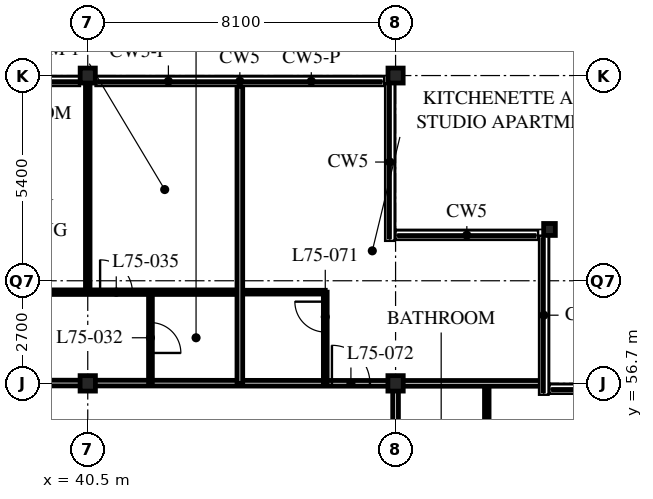
"""IFC4 building model, lengths in metres.
Left out: names, types, materials, properties, quantities, classifications, styles, units other than length and angle.
Written with IfcOpenShell. Run it as: python <this file> out.ifc"""

import sys

from ifc_helpers import new_model, si_unit, direction, frame, frame_2d, origin, origin_2d, place, context, subcontext, project, spatial, rectangle, i_section, extrude, element, fill, save


model = new_model("IFC4")
c1 = context("Model", 3, precision=1e-05, world=origin(), true_north=direction((0.0, 1.0)))
c2 = subcontext(c1, "Body", "Model", "MODEL_VIEW")
j1 = project(units=[si_unit("LENGTHUNIT", "METRE"), si_unit("PLANEANGLEUNIT", "RADIAN")], contexts=[c1])
p1 = place(None, origin())
s1 = spatial("IfcSite", under=j1, at=p1, CompositionType="ELEMENT")
p2 = place(p1, origin())
s2 = spatial("IfcBuilding", under=s1, at=p2, CompositionType="ELEMENT")
p3 = place(p2, frame((0.0, 0.0, 293.1)))
s3 = spatial("IfcBuildingStorey", under=s2, at=p3, CompositionType="ELEMENT", Elevation=293.1)
p4 = place(p3, frame((40.5, 56.7, 0.0), z_axis=(0.0, 0.0, 1.0), x_axis=(1.0, 0.0, 0.0)))
e1 = element("IfcColumn", 1, at=p4, inside=s3, PredefinedType="COLUMN", context=c2, shape_type="SweptSolid", body=[
    extrude(i_section(OverallWidth=0.403, OverallDepth=0.406, WebThickness=0.027, FlangeThickness=0.043, FilletRadius=0.015, at=origin_2d()), origin(), (0.0, 0.0, 1.0), 5.4),
])
p5 = place(p3, frame((40.5, 64.8, 0.0), z_axis=(0.0, 0.0, 1.0), x_axis=(1.0, 0.0, 0.0)))
e2 = element("IfcColumn", 2, at=p5, inside=s3, PredefinedType="COLUMN", context=c2, shape_type="SweptSolid", body=[
    extrude(i_section(OverallWidth=0.399, OverallDepth=0.394, WebThickness=0.023, FlangeThickness=0.037, FilletRadius=0.015, at=origin_2d()), origin(), (0.0, 0.0, 1.0), 5.4),
])
p6 = place(p3, frame((48.6, 56.7, 0.0), z_axis=(0.0, 0.0, 1.0), x_axis=(1.0, 0.0, 0.0)))
e3 = element("IfcColumn", 3, at=p6, inside=s3, PredefinedType="COLUMN", context=c2, shape_type="SweptSolid", body=[
    extrude(i_section(OverallWidth=0.403, OverallDepth=0.406, WebThickness=0.027, FlangeThickness=0.043, FilletRadius=0.015, at=origin_2d()), origin(), (0.0, 0.0, 1.0), 5.4),
])
p7 = place(p3, frame((48.6, 64.8, 0.0), z_axis=(0.0, 0.0, 1.0), x_axis=(1.0, 0.0, 0.0)))
e4 = element("IfcColumn", 4, at=p7, inside=s3, PredefinedType="COLUMN", context=c2, shape_type="SweptSolid", body=[
    extrude(i_section(OverallWidth=0.399, OverallDepth=0.394, WebThickness=0.023, FlangeThickness=0.037, FilletRadius=0.015, at=origin_2d()), origin(), (0.0, 0.0, 1.0), 5.4),
])
p8 = place(p3, frame((52.65, 60.75, 0.0), z_axis=(0.0, 0.0, 1.0), x_axis=(1.0, 0.0, 0.0)))
e5 = element("IfcColumn", 5, at=p8, inside=s3, PredefinedType="COLUMN", context=c2, shape_type="SweptSolid", body=[
    extrude(i_section(OverallWidth=0.307, OverallDepth=0.314, WebThickness=0.012, FlangeThickness=0.019, FilletRadius=0.015, at=origin_2d()), origin(), (0.0, 0.0, 1.0), 5.4),
])
p9 = place(p3, frame((8.1, 56.738, 0.0), z_axis=(0.0, 0.0, 1.0), x_axis=(0.999999569095, -0.000928336791, 0.0)))
e6 = element("IfcWall", 6, at=p9, inside=s3, PredefinedType="PARTITIONING", context=c2, shape_type="SweptSolid", body=[
    extrude(rectangle(XDim=40.5, YDim=0.15, at=frame_2d((20.25, 0.0))), origin(), (0.0, 0.0, 1.0), 4.271),
])
p10 = place(p9, frame((4.45, 0.0, 0.0)))
e7 = element("IfcOpeningElement", 7, at=p10, cuts=e6, PredefinedType="OPENING", context=c2, shape_type="SweptSolid", body=[
    extrude(rectangle(XDim=1.0, YDim=2.1, at=frame_2d((0.5, 1.05))), frame((0.0, 0.085, 0.0), z_axis=(0.0, -1.0, 0.0), x_axis=(1.0, 0.0, 0.0)), (0.0, 0.0, 1.0), 0.17),
])
p11 = place(p9, frame((12.55, 0.0, 0.0)))
e8 = element("IfcOpeningElement", 8, at=p11, cuts=e6, PredefinedType="OPENING", context=c2, shape_type="SweptSolid", body=[
    extrude(rectangle(XDim=1.0, YDim=2.1, at=frame_2d((0.5, 1.05))), frame((0.0, 0.085, 0.0), z_axis=(0.0, -1.0, 0.0), x_axis=(1.0, 0.0, 0.0)), (0.0, 0.0, 1.0), 0.17),
])
p12 = place(p9, frame((20.65, 0.0, 0.0)))
e9 = element("IfcOpeningElement", 9, at=p12, cuts=e6, PredefinedType="OPENING", context=c2, shape_type="SweptSolid", body=[
    extrude(rectangle(XDim=1.0, YDim=2.1, at=frame_2d((0.5, 1.05))), frame((0.0, 0.085, 0.0), z_axis=(0.0, -1.0, 0.0), x_axis=(1.0, 0.0, 0.0)), (0.0, 0.0, 1.0), 0.17),
])
p13 = place(p9, frame((28.75, 0.0, 0.0)))
e10 = element("IfcOpeningElement", 10, at=p13, cuts=e6, PredefinedType="OPENING", context=c2, shape_type="SweptSolid", body=[
    extrude(rectangle(XDim=1.0, YDim=2.1, at=frame_2d((0.5, 1.05))), frame((0.0, 0.085, 0.0), z_axis=(0.0, -1.0, 0.0), x_axis=(1.0, 0.0, 0.0)), (0.0, 0.0, 1.0), 0.17),
])
p14 = place(p9, frame((38.825, 0.0, 0.0)))
e11 = element("IfcOpeningElement", 11, at=p14, cuts=e6, PredefinedType="OPENING", context=c2, shape_type="SweptSolid", body=[
    extrude(rectangle(XDim=1.0, YDim=2.1, at=frame_2d((0.5, 1.05))), frame((0.0, 0.085, 0.0), z_axis=(0.0, -1.0, 0.0), x_axis=(1.0, 0.0, 0.0)), (0.0, 0.0, 1.0), 0.17),
])
p15 = place(p9, frame((0.675, 0.0, 0.0)))
e12 = element("IfcOpeningElement", 12, at=p15, cuts=e6, PredefinedType="OPENING", context=c2, shape_type="SweptSolid", body=[
    extrude(rectangle(XDim=1.0, YDim=2.1, at=frame_2d((0.5, 1.05))), frame((0.0, 0.085, 0.0), z_axis=(0.0, -1.0, 0.0), x_axis=(1.0, 0.0, 0.0)), (0.0, 0.0, 1.0), 0.17),
])
p16 = place(p3, frame((48.6, 22.5, 0.0), z_axis=(0.0, 0.0, 1.0), x_axis=(0.0, 1.0, 0.0)))
e13 = element("IfcWall", 13, at=p16, inside=s3, PredefinedType="PARTITIONING", context=c2, shape_type="SweptSolid", body=[
    extrude(rectangle(XDim=34.2, YDim=0.15, at=frame_2d((17.1, 0.0))), origin(), (0.0, 0.0, 1.0), 4.271),
])
p17 = place(p16, frame((2.65, 0.0, 0.0)))
e14 = element("IfcOpeningElement", 14, at=p17, cuts=e13, PredefinedType="OPENING", context=c2, shape_type="SweptSolid", body=[
    extrude(rectangle(XDim=1.0, YDim=2.1, at=frame_2d((0.5, 1.05))), frame((0.0, 0.085, 0.0), z_axis=(0.0, -1.0, 0.0), x_axis=(1.0, 0.0, 0.0)), (0.0, 0.0, 1.0), 0.17),
])
p18 = place(p16, frame((10.8, 0.0, 0.0)))
e15 = element("IfcOpeningElement", 15, at=p18, cuts=e13, PredefinedType="OPENING", context=c2, shape_type="SweptSolid", body=[
    extrude(rectangle(XDim=1.0, YDim=2.1, at=frame_2d((0.5, 1.05))), frame((0.0, 0.085, 0.0), z_axis=(0.0, -1.0, 0.0), x_axis=(1.0, 0.0, 0.0)), (0.0, 0.0, 1.0), 0.17),
])
p19 = place(p16, frame((18.9, 0.0, 0.0)))
e16 = element("IfcOpeningElement", 16, at=p19, cuts=e13, PredefinedType="OPENING", context=c2, shape_type="SweptSolid", body=[
    extrude(rectangle(XDim=1.0, YDim=2.1, at=frame_2d((0.5, 1.05))), frame((0.0, 0.085, 0.0), z_axis=(0.0, -1.0, 0.0), x_axis=(1.0, 0.0, 0.0)), (0.0, 0.0, 1.0), 0.17),
])
p20 = place(p16, frame((27.0, 0.0, 0.0)))
e17 = element("IfcOpeningElement", 17, at=p20, cuts=e13, PredefinedType="OPENING", context=c2, shape_type="SweptSolid", body=[
    extrude(rectangle(XDim=1.0, YDim=2.1, at=frame_2d((0.5, 1.05))), frame((0.0, 0.085, 0.0), z_axis=(0.0, -1.0, 0.0), x_axis=(1.0, 0.0, 0.0)), (0.0, 0.0, 1.0), 0.17),
])
p21 = place(p3, frame((12.15, 59.1, 0.0), z_axis=(0.0, 0.0, 1.0), x_axis=(1.0, 0.0, 0.0)))
e18 = element("IfcWall", 18, at=p21, inside=s3, PredefinedType="PARTITIONING", context=c2, shape_type="SweptSolid", body=[
    extrude(rectangle(XDim=32.352, YDim=0.12, at=frame_2d((16.176, 0.0))), origin(), (0.0, 0.0, 1.0), 5.19),
])
p22 = place(p21, frame((0.975, 0.0, 0.0)))
e19 = element("IfcOpeningElement", 19, at=p22, cuts=e18, PredefinedType="OPENING", context=c2, shape_type="SweptSolid", body=[
    extrude(rectangle(XDim=0.85, YDim=2.1, at=frame_2d((0.425, 1.05))), frame((0.0, 0.07, 0.0), z_axis=(0.0, -1.0, 0.0), x_axis=(1.0, 0.0, 0.0)), (0.0, 0.0, 1.0), 0.14),
])
p23 = place(p21, frame((4.375, 0.0, 0.0)))
e20 = element("IfcOpeningElement", 20, at=p23, cuts=e18, PredefinedType="OPENING", context=c2, shape_type="SweptSolid", body=[
    extrude(rectangle(XDim=0.85, YDim=2.1, at=frame_2d((0.425, 1.05))), frame((0.0, 0.07, 0.0), z_axis=(0.0, -1.0, 0.0), x_axis=(1.0, 0.0, 0.0)), (0.0, 0.0, 1.0), 0.14),
])
p24 = place(p21, frame((9.075, 0.0, 0.0)))
e21 = element("IfcOpeningElement", 21, at=p24, cuts=e18, PredefinedType="OPENING", context=c2, shape_type="SweptSolid", body=[
    extrude(rectangle(XDim=0.85, YDim=2.1, at=frame_2d((0.425, 1.05))), frame((0.0, 0.07, 0.0), z_axis=(0.0, -1.0, 0.0), x_axis=(1.0, 0.0, 0.0)), (0.0, 0.0, 1.0), 0.14),
])
p25 = place(p21, frame((12.475, 0.0, 0.0)))
e22 = element("IfcOpeningElement", 22, at=p25, cuts=e18, PredefinedType="OPENING", context=c2, shape_type="SweptSolid", body=[
    extrude(rectangle(XDim=0.85, YDim=2.1, at=frame_2d((0.425, 1.05))), frame((0.0, 0.07, 0.0), z_axis=(0.0, -1.0, 0.0), x_axis=(1.0, 0.0, 0.0)), (0.0, 0.0, 1.0), 0.14),
])
p26 = place(p21, frame((17.175, 0.0, 0.0)))
e23 = element("IfcOpeningElement", 23, at=p26, cuts=e18, PredefinedType="OPENING", context=c2, shape_type="SweptSolid", body=[
    extrude(rectangle(XDim=0.85, YDim=2.1, at=frame_2d((0.425, 1.05))), frame((0.0, 0.07, 0.0), z_axis=(0.0, -1.0, 0.0), x_axis=(1.0, 0.0, 0.0)), (0.0, 0.0, 1.0), 0.14),
])
p27 = place(p21, frame((20.575, 0.0, 0.0)))
e24 = element("IfcOpeningElement", 24, at=p27, cuts=e18, PredefinedType="OPENING", context=c2, shape_type="SweptSolid", body=[
    extrude(rectangle(XDim=0.85, YDim=2.1, at=frame_2d((0.425, 1.05))), frame((0.0, 0.07, 0.0), z_axis=(0.0, -1.0, 0.0), x_axis=(1.0, 0.0, 0.0)), (0.0, 0.0, 1.0), 0.14),
])
p28 = place(p21, frame((25.275, 0.0, 0.0)))
e25 = element("IfcOpeningElement", 25, at=p28, cuts=e18, PredefinedType="OPENING", context=c2, shape_type="SweptSolid", body=[
    extrude(rectangle(XDim=0.85, YDim=2.1, at=frame_2d((0.425, 1.05))), frame((0.0, 0.07, 0.0), z_axis=(0.0, -1.0, 0.0), x_axis=(1.0, 0.0, 0.0)), (0.0, 0.0, 1.0), 0.14),
])
p29 = place(p21, frame((28.675, 0.0, 0.0)))
e26 = element("IfcOpeningElement", 26, at=p29, cuts=e18, PredefinedType="OPENING", context=c2, shape_type="SweptSolid", body=[
    extrude(rectangle(XDim=0.85, YDim=2.1, at=frame_2d((0.425, 1.05))), frame((0.0, 0.07, 0.0), z_axis=(0.0, -1.0, 0.0), x_axis=(1.0, 0.0, 0.0)), (0.0, 0.0, 1.0), 0.14),
])
p30 = place(p3, frame((42.15, 56.7, 0.0), z_axis=(0.0, 0.0, 1.0), x_axis=(0.0, 1.0, 0.0)))
e27 = element("IfcWall", 27, at=p30, inside=s3, PredefinedType="PARTITIONING", context=c2, shape_type="SweptSolid", body=[
    extrude(rectangle(XDim=2.4, YDim=0.1, at=frame_2d((1.2, 0.0))), origin(), (0.0, 0.0, 1.0), 5.19),
])
p31 = place(p30, frame((0.8, 0.0, 0.0)))
e28 = element("IfcOpeningElement", 28, at=p31, cuts=e27, PredefinedType="OPENING", context=c2, shape_type="SweptSolid", body=[
    extrude(rectangle(XDim=0.8, YDim=2.1, at=frame_2d((0.4, 1.05))), frame((0.0, 0.06, 0.0), z_axis=(0.0, -1.0, 0.0), x_axis=(1.0, 0.0, 0.0)), (0.0, 0.0, 1.0), 0.12),
])
p32 = place(p3, frame((40.5, 59.1, 0.0), z_axis=(0.0, 0.0, 1.0), x_axis=(0.0, 1.0, 0.0)))
e29 = element("IfcWall", 29, at=p32, inside=s3, PredefinedType="PARTITIONING", context=c2, shape_type="SweptSolid", body=[
    extrude(rectangle(XDim=5.4, YDim=0.12, at=frame_2d((2.7, 0.0))), origin(), (0.0, 0.0, 1.0), 4.271),
])
p33 = place(p3, frame((51.0, 22.5, 0.0), z_axis=(0.0, 0.0, 1.0), x_axis=(0.0, 1.0, 0.0)))
e30 = element("IfcWall", 30, at=p33, inside=s3, PredefinedType="PARTITIONING", context=c2, shape_type="SweptSolid", body=[
    extrude(rectangle(XDim=34.2, YDim=0.12, at=frame_2d((17.1, 0.0))), origin(), (0.0, 0.0, 1.0), 5.19),
])
p34 = place(p33, frame((0.975, 0.0, 0.0)))
e31 = element("IfcOpeningElement", 31, at=p34, cuts=e30, PredefinedType="OPENING", context=c2, shape_type="SweptSolid", body=[
    extrude(rectangle(XDim=0.85, YDim=2.1, at=frame_2d((0.425, 1.05))), frame((0.0, 0.07, 0.0), z_axis=(0.0, -1.0, 0.0), x_axis=(1.0, 0.0, 0.0)), (0.0, 0.0, 1.0), 0.14),
])
p35 = place(p33, frame((6.175, 0.0, 0.0)))
e32 = element("IfcOpeningElement", 32, at=p35, cuts=e30, PredefinedType="OPENING", context=c2, shape_type="SweptSolid", body=[
    extrude(rectangle(XDim=0.85, YDim=2.1, at=frame_2d((0.425, 1.05))), frame((0.0, 0.07, 0.0), z_axis=(0.0, -1.0, 0.0), x_axis=(1.0, 0.0, 0.0)), (0.0, 0.0, 1.0), 0.14),
])
p36 = place(p33, frame((10.875, 0.0, 0.0)))
e33 = element("IfcOpeningElement", 33, at=p36, cuts=e30, PredefinedType="OPENING", context=c2, shape_type="SweptSolid", body=[
    extrude(rectangle(XDim=0.85, YDim=2.1, at=frame_2d((0.425, 1.05))), frame((0.0, 0.07, 0.0), z_axis=(0.0, -1.0, 0.0), x_axis=(1.0, 0.0, 0.0)), (0.0, 0.0, 1.0), 0.14),
])
p37 = place(p33, frame((14.275, 0.0, 0.0)))
e34 = element("IfcOpeningElement", 34, at=p37, cuts=e30, PredefinedType="OPENING", context=c2, shape_type="SweptSolid", body=[
    extrude(rectangle(XDim=0.85, YDim=2.1, at=frame_2d((0.425, 1.05))), frame((0.0, 0.07, 0.0), z_axis=(0.0, -1.0, 0.0), x_axis=(1.0, 0.0, 0.0)), (0.0, 0.0, 1.0), 0.14),
])
p38 = place(p33, frame((18.975, 0.0, 0.0)))
e35 = element("IfcOpeningElement", 35, at=p38, cuts=e30, PredefinedType="OPENING", context=c2, shape_type="SweptSolid", body=[
    extrude(rectangle(XDim=0.85, YDim=2.1, at=frame_2d((0.425, 1.05))), frame((0.0, 0.07, 0.0), z_axis=(0.0, -1.0, 0.0), x_axis=(1.0, 0.0, 0.0)), (0.0, 0.0, 1.0), 0.14),
])
p39 = place(p33, frame((22.375, 0.0, 0.0)))
e36 = element("IfcOpeningElement", 36, at=p39, cuts=e30, PredefinedType="OPENING", context=c2, shape_type="SweptSolid", body=[
    extrude(rectangle(XDim=0.85, YDim=2.1, at=frame_2d((0.425, 1.05))), frame((0.0, 0.07, 0.0), z_axis=(0.0, -1.0, 0.0), x_axis=(1.0, 0.0, 0.0)), (0.0, 0.0, 1.0), 0.14),
])
p40 = place(p33, frame((27.075, 0.0, 0.0)))
e37 = element("IfcOpeningElement", 37, at=p40, cuts=e30, PredefinedType="OPENING", context=c2, shape_type="SweptSolid", body=[
    extrude(rectangle(XDim=0.85, YDim=2.1, at=frame_2d((0.425, 1.05))), frame((0.0, 0.07, 0.0), z_axis=(0.0, -1.0, 0.0), x_axis=(1.0, 0.0, 0.0)), (0.0, 0.0, 1.0), 0.14),
])
p41 = place(p33, frame((30.475, 0.0, 0.0)))
e38 = element("IfcOpeningElement", 38, at=p41, cuts=e30, PredefinedType="OPENING", context=c2, shape_type="SweptSolid", body=[
    extrude(rectangle(XDim=0.85, YDim=2.1, at=frame_2d((0.425, 1.05))), frame((0.0, 0.07, 0.0), z_axis=(0.0, -1.0, 0.0), x_axis=(1.0, 0.0, 0.0)), (0.0, 0.0, 1.0), 0.14),
])
p42 = place(p3, frame((44.502, 59.1, 0.0), z_axis=(0.0, 0.0, 1.0), x_axis=(1.0, 0.0, 0.0)))
e39 = element("IfcWall", 39, at=p42, inside=s3, PredefinedType="PARTITIONING", context=c2, shape_type="SweptSolid", body=[
    extrude(rectangle(XDim=2.248, YDim=0.1, at=frame_2d((1.124, 0.0))), origin(), (0.0, 0.0, 1.0), 5.19),
])
p43 = place(p3, frame((46.75, 56.7, 0.0), z_axis=(0.0, 0.0, 1.0), x_axis=(0.0, 1.0, 0.0)))
e40 = element("IfcWall", 40, at=p43, inside=s3, PredefinedType="PARTITIONING", context=c2, shape_type="SweptSolid", body=[
    extrude(rectangle(XDim=2.4, YDim=0.1, at=frame_2d((1.2, 0.0))), origin(), (0.0, 0.0, 1.0), 5.19),
])
p44 = place(p43, frame((1.35, 0.0, 0.0)))
e41 = element("IfcOpeningElement", 41, at=p44, cuts=e40, PredefinedType="OPENING", context=c2, shape_type="SweptSolid", body=[
    extrude(rectangle(XDim=0.8, YDim=2.1, at=frame_2d((0.4, 1.05))), frame((0.0, 0.06, 0.0), z_axis=(0.0, -1.0, 0.0), x_axis=(1.0, 0.0, 0.0)), (0.0, 0.0, 1.0), 0.12),
])
p45 = place(p3, frame((48.6, 56.7, 0.0), z_axis=(0.0, 0.0, 1.0), x_axis=(1.0, 0.0, 0.0)))
e42 = element("IfcWall", 42, at=p45, inside=s3, PredefinedType="PARTITIONING", context=c2, shape_type="SweptSolid", body=[
    extrude(rectangle(XDim=3.879, YDim=0.15, at=frame_2d((1.939, 0.0))), origin(), (0.0, 0.0, 1.0), 4.271),
])
p46 = place(p3, frame((44.502, 56.7, 0.0), z_axis=(0.0, 0.0, 1.0), x_axis=(0.0, 1.0, 0.0)))
e43 = element("IfcWall", 43, at=p46, inside=s3, PredefinedType="PARTITIONING", context=c2, shape_type="SweptSolid", body=[
    extrude(rectangle(XDim=7.822, YDim=0.15, at=frame_2d((3.911, 0.0))), origin(), (0.0, 0.0, 1.0), 5.19),
])
p47 = place(p31, origin())
e44 = element("IfcDoor", 44, at=p47, inside=s3, OperationType="SINGLE_SWING_RIGHT", PredefinedType="DOOR", context=c2, shape_type="SweptSolid", body=[
    extrude(rectangle(XDim=0.8, YDim=2.1, at=frame_2d((0.4, 1.05))), frame((0.0, 0.025, 0.0), z_axis=(0.0, -1.0, 0.0), x_axis=(1.0, 0.0, 0.0)), (0.0, 0.0, 1.0), 0.05),
])
fill(e28, e44)
p48 = place(p29, origin())
e45 = element("IfcDoor", 45, at=p48, inside=s3, OperationType="SINGLE_SWING_LEFT", PredefinedType="DOOR", context=c2, shape_type="SweptSolid", body=[
    extrude(rectangle(XDim=0.85, YDim=2.1, at=frame_2d((0.425, 1.05))), frame((0.0, 0.025, 0.0), z_axis=(0.0, -1.0, 0.0), x_axis=(1.0, 0.0, 0.0)), (0.0, 0.0, 1.0), 0.05),
])
fill(e26, e45)
p49 = place(p44, origin())
e46 = element("IfcDoor", 46, at=p49, inside=s3, OperationType="SINGLE_SWING_RIGHT", PredefinedType="DOOR", context=c2, shape_type="SweptSolid", body=[
    extrude(rectangle(XDim=0.8, YDim=2.1, at=frame_2d((0.4, 1.05))), frame((0.0, 0.025, 0.0), z_axis=(0.0, -1.0, 0.0), x_axis=(1.0, 0.0, 0.0)), (0.0, 0.0, 1.0), 0.05),
])
fill(e41, e46)
p50 = place(p14, origin())
e47 = element("IfcDoor", 47, at=p50, inside=s3, OperationType="SINGLE_SWING_LEFT", PredefinedType="DOOR", context=c2, shape_type="SweptSolid", body=[
    extrude(rectangle(XDim=1.0, YDim=2.1, at=frame_2d((0.5, 1.05))), frame((0.0, 0.025, 0.0), z_axis=(0.0, -1.0, 0.0), x_axis=(1.0, 0.0, 0.0)), (0.0, 0.0, 1.0), 0.05),
])
fill(e11, e47)
save(model, sys.argv[1])
